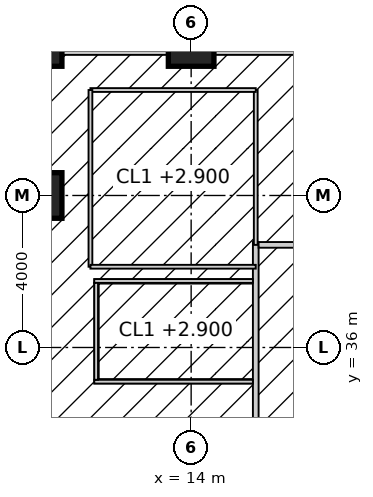
"""IFC4 building model, lengths in metres.
Left out: names, types, materials, properties, quantities, classifications, styles, units other than length and angle.
Written with IfcOpenShell. Run it as: python <this file> out.ifc"""

import sys

from ifc_helpers import new_model, si_unit, direction, frame, frame_2d, origin, origin_2d, place, context, subcontext, project, spatial, rectangle, hollow_rectangle, extrude, element, fill, save


model = new_model("IFC4")
c1 = context("Model", 3, precision=1e-05, world=origin(), true_north=direction((0.0, 1.0)))
c2 = subcontext(c1, "Body", "Model", "MODEL_VIEW")
j1 = project(units=[si_unit("LENGTHUNIT", "METRE"), si_unit("PLANEANGLEUNIT", "RADIAN")], contexts=[c1])
p1 = place(None, origin())
s1 = spatial("IfcSite", under=j1, at=p1, CompositionType="ELEMENT")
p2 = place(p1, origin())
s2 = spatial("IfcBuilding", under=s1, at=p2, CompositionType="ELEMENT")
p3 = place(p2, frame((0.0, 0.0, 19.0)))
s3 = spatial("IfcBuildingStorey", under=s2, at=p3, CompositionType="ELEMENT", Elevation=19.0)
for number, where, z_axis, x_axis in (
    (1, (10.0, 44.0, 0.0), (0.0, 0.0, 1.0), (1.0, 0.0, 0.0)),
    (2, (14.0, 44.0, 0.0), (0.0, 0.0, 1.0), (1.0, 0.0, 0.0)),
    (3, (10.0, 40.0, 0.0), (0.0, 0.0, 1.0), (1.0, 0.0, 0.0)),
):
    element("IfcColumn", number, at=place(p3, frame(where, z_axis=z_axis, x_axis=x_axis)), inside=s3, PredefinedType="COLUMN", context=c2, shape_type="SweptSolid", body=[
        extrude(hollow_rectangle(XDim=1.2, YDim=1.2, WallThickness=0.1, at=origin_2d()), origin(), (0.0, 0.0, 1.0), 4.0),
    ])
p4 = place(p3, frame((15.7, 15.225, 0.0), z_axis=(0.0, 0.0, 1.0), x_axis=(0.0, 1.0, 0.0)))
e4 = element("IfcWall", 4, at=p4, inside=s3, PredefinedType="PARTITIONING", context=c2, shape_type="SweptSolid", body=[
    extrude(rectangle(XDim=23.55, YDim=0.15, at=frame_2d((11.775, 0.0))), origin(), (0.0, 0.0, 1.0), 3.85),
])
p5 = place(p4, frame((5.175, 0.0, 0.0)))
e5 = element("IfcOpeningElement", 5, at=p5, cuts=e4, PredefinedType="OPENING", context=c2, shape_type="SweptSolid", body=[
    extrude(rectangle(XDim=1.8, YDim=2.4, at=frame_2d((0.9, 1.2))), frame((0.0, 0.085, 0.0), z_axis=(0.0, -1.0, 0.0), x_axis=(1.0, 0.0, 0.0)), (0.0, 0.0, 1.0), 0.17),
])
p6 = place(p4, frame((16.825, 0.0, 0.0)))
e6 = element("IfcOpeningElement", 6, at=p6, cuts=e4, PredefinedType="OPENING", context=c2, shape_type="SweptSolid", body=[
    extrude(rectangle(XDim=1.8, YDim=2.4, at=frame_2d((0.9, 1.2))), frame((0.0, 0.085, 0.0), z_axis=(0.0, -1.0, 0.0), x_axis=(1.0, 0.0, 0.0)), (0.0, 0.0, 1.0), 0.17),
])
p7 = place(p3, frame((15.775, 38.7, 0.0), z_axis=(0.0, 0.0, 1.0), x_axis=(1.0, 0.0, 0.0)))
e7 = element("IfcWall", 7, at=p7, inside=s3, PredefinedType="PARTITIONING", context=c2, shape_type="SweptSolid", body=[
    extrude(rectangle(XDim=28.45, YDim=0.15, at=frame_2d((14.225, 0.0))), origin(), (0.0, 0.0, 1.0), 3.85),
])
p8 = place(p7, frame((7.975, 0.0, 0.0)))
e8 = element("IfcOpeningElement", 8, at=p8, cuts=e7, PredefinedType="OPENING", context=c2, shape_type="SweptSolid", body=[
    extrude(rectangle(XDim=0.9, YDim=2.1, at=frame_2d((0.45, 1.05))), frame((0.0, 0.085, 0.0), z_axis=(0.0, -1.0, 0.0), x_axis=(1.0, 0.0, 0.0)), (0.0, 0.0, 1.0), 0.17),
])
p9 = place(p7, frame((11.725, 0.0, 0.0)))
e9 = element("IfcOpeningElement", 9, at=p9, cuts=e7, PredefinedType="OPENING", context=c2, shape_type="SweptSolid", body=[
    extrude(rectangle(XDim=1.0, YDim=2.1, at=frame_2d((0.5, 1.05))), frame((0.0, 0.085, 0.0), z_axis=(0.0, -1.0, 0.0), x_axis=(1.0, 0.0, 0.0)), (0.0, 0.0, 1.0), 0.17),
])
p10 = place(p7, frame((15.575, 0.0, 0.0)))
e10 = element("IfcOpeningElement", 10, at=p10, cuts=e7, PredefinedType="OPENING", context=c2, shape_type="SweptSolid", body=[
    extrude(rectangle(XDim=0.9, YDim=2.1, at=frame_2d((0.45, 1.05))), frame((0.0, 0.085, 0.0), z_axis=(0.0, -1.0, 0.0), x_axis=(1.0, 0.0, 0.0)), (0.0, 0.0, 1.0), 0.17),
])
for number, where, z_axis, x_axis in (
    (11, (11.45, 35.1, 0.0), (0.0, 0.0, 1.0), (1.0, 0.0, 0.0)),
    (12, (11.45, 37.75, 0.0), (0.0, 0.0, 1.0), (1.0, 0.0, 0.0)),
):
    element("IfcWall", number, at=place(p3, frame(where, z_axis=z_axis, x_axis=x_axis)), inside=s3, PredefinedType="PARTITIONING", context=c2, shape_type="SweptSolid", body=[
        extrude(rectangle(XDim=4.175, YDim=0.1, at=frame_2d((2.087, 0.0))), origin(), (0.0, 0.0, 1.0), 3.85),
    ])
p11 = place(p3, frame((11.5, 35.15, 0.0), z_axis=(0.0, 0.0, 1.0), x_axis=(0.0, 1.0, 0.0)))
e13 = element("IfcWall", 13, at=p11, inside=s3, PredefinedType="PARTITIONING", context=c2, shape_type="SweptSolid", body=[
    extrude(rectangle(XDim=2.55, YDim=0.1, at=frame_2d((1.275, 0.0))), origin(), (0.0, 0.0, 1.0), 3.85),
])
p12 = place(p11, frame((0.775, 0.0, 0.0)))
e14 = element("IfcOpeningElement", 14, at=p12, cuts=e13, PredefinedType="OPENING", context=c2, shape_type="SweptSolid", body=[
    extrude(rectangle(XDim=1.0, YDim=2.2, at=frame_2d((0.5, 1.1))), frame((0.0, 0.06, 0.0), z_axis=(0.0, -1.0, 0.0), x_axis=(1.0, 0.0, 0.0)), (0.0, 0.0, 1.0), 0.12),
])
p13 = place(p3, frame((15.7, 38.7, 0.0), z_axis=(0.0, 0.0, 1.0), x_axis=(0.0, 1.0, 0.0)))
e15 = element("IfcWall", 15, at=p13, inside=s3, PredefinedType="PARTITIONING", context=c2, shape_type="SweptSolid", body=[
    extrude(rectangle(XDim=4.075, YDim=0.1, at=frame_2d((2.038, 0.0))), origin(), (0.0, 0.0, 1.0), 3.85),
])
p14 = place(p3, frame((15.7, 42.775, 0.0), z_axis=(0.0, 0.0, 1.0), x_axis=(-1.0, 0.0, 0.0)))
e16 = element("IfcWall", 16, at=p14, inside=s3, PredefinedType="PARTITIONING", context=c2, shape_type="SweptSolid", body=[
    extrude(rectangle(XDim=4.35, YDim=0.1, at=frame_2d((2.175, 0.0))), origin(), (0.0, 0.0, 1.0), 3.85),
])
p15 = place(p3, frame((11.35, 42.775, 0.0), z_axis=(0.0, 0.0, 1.0), x_axis=(0.0, -1.0, 0.0)))
e17 = element("IfcWall", 17, at=p15, inside=s3, PredefinedType="PARTITIONING", context=c2, shape_type="SweptSolid", body=[
    extrude(rectangle(XDim=4.65, YDim=0.1, at=frame_2d((2.325, 0.0))), origin(), (0.0, 0.0, 1.0), 3.85),
])
p16 = place(p15, frame((1.025, 0.0, 0.0)))
e18 = element("IfcOpeningElement", 18, at=p16, cuts=e17, PredefinedType="OPENING", context=c2, shape_type="SweptSolid", body=[
    extrude(rectangle(XDim=1.0, YDim=2.2, at=frame_2d((0.5, 1.1))), frame((0.0, 0.06, 0.0), z_axis=(0.0, -1.0, 0.0), x_axis=(1.0, 0.0, 0.0)), (0.0, 0.0, 1.0), 0.12),
])
p17 = place(p3, frame((11.35, 38.125, 0.0), z_axis=(0.0, 0.0, 1.0), x_axis=(1.0, 0.0, 0.0)))
e19 = element("IfcWall", 19, at=p17, inside=s3, PredefinedType="PARTITIONING", context=c2, shape_type="SweptSolid", body=[
    extrude(rectangle(XDim=4.35, YDim=0.1, at=frame_2d((2.175, 0.0))), origin(), (0.0, 0.0, 1.0), 3.85),
])
p18 = place(p3, frame((13.4, 43.85, 0.0), z_axis=(0.0, 0.0, 1.0), x_axis=(-1.0, 0.0, 0.0)))
e20 = element("IfcWall", 20, at=p18, inside=s3, PredefinedType="ELEMENTEDWALL", context=c2, shape_type="SweptSolid", body=[
    extrude(rectangle(XDim=2.8, YDim=0.3, at=frame_2d((1.4, 0.0))), origin(), (0.0, 0.0, 1.0), 2.85),
])
p19 = place(p18, frame((0.4, 0.0, 0.8)))
e21 = element("IfcOpeningElement", 21, at=p19, cuts=e20, PredefinedType="OPENING", context=c2, shape_type="SweptSolid", body=[
    extrude(rectangle(XDim=2.0, YDim=2.0, at=frame_2d((1.0, 1.0))), frame((0.0, 0.16, 0.0), z_axis=(0.0, -1.0, 0.0), x_axis=(1.0, 0.0, 0.0)), (0.0, 0.0, 1.0), 0.32),
])
p20 = place(p3, frame((17.4, 43.85, 0.0), z_axis=(0.0, 0.0, 1.0), x_axis=(-1.0, 0.0, 0.0)))
e22 = element("IfcWall", 22, at=p20, inside=s3, PredefinedType="ELEMENTEDWALL", context=c2, shape_type="SweptSolid", body=[
    extrude(rectangle(XDim=2.8, YDim=0.3, at=frame_2d((1.4, 0.0))), origin(), (0.0, 0.0, 1.0), 2.85),
])
p21 = place(p20, frame((0.4, 0.0, 0.8)))
e23 = element("IfcOpeningElement", 23, at=p21, cuts=e22, PredefinedType="OPENING", context=c2, shape_type="SweptSolid", body=[
    extrude(rectangle(XDim=2.0, YDim=2.0, at=frame_2d((1.0, 1.0))), frame((0.0, 0.16, 0.0), z_axis=(0.0, -1.0, 0.0), x_axis=(1.0, 0.0, 0.0)), (0.0, 0.0, 1.0), 0.32),
])
p22 = place(p12, origin())
e24 = element("IfcDoor", 24, at=p22, inside=s3, OperationType="SINGLE_SWING_LEFT", PredefinedType="DOOR", context=c2, shape_type="SweptSolid", body=[
    extrude(rectangle(XDim=1.0, YDim=2.2, at=frame_2d((0.5, 1.1))), frame((0.0, 0.025, 0.0), z_axis=(0.0, -1.0, 0.0), x_axis=(1.0, 0.0, 0.0)), (0.0, 0.0, 1.0), 0.05),
])
fill(e14, e24)
p23 = place(p16, origin())
e25 = element("IfcDoor", 25, at=p23, inside=s3, OperationType="SINGLE_SWING_RIGHT", PredefinedType="DOOR", context=c2, shape_type="SweptSolid", body=[
    extrude(rectangle(XDim=1.0, YDim=2.2, at=frame_2d((0.5, 1.1))), frame((0.0, 0.025, 0.0), z_axis=(0.0, -1.0, 0.0), x_axis=(1.0, 0.0, 0.0)), (0.0, 0.0, 1.0), 0.05),
])
fill(e18, e25)
save(model, sys.argv[1])
